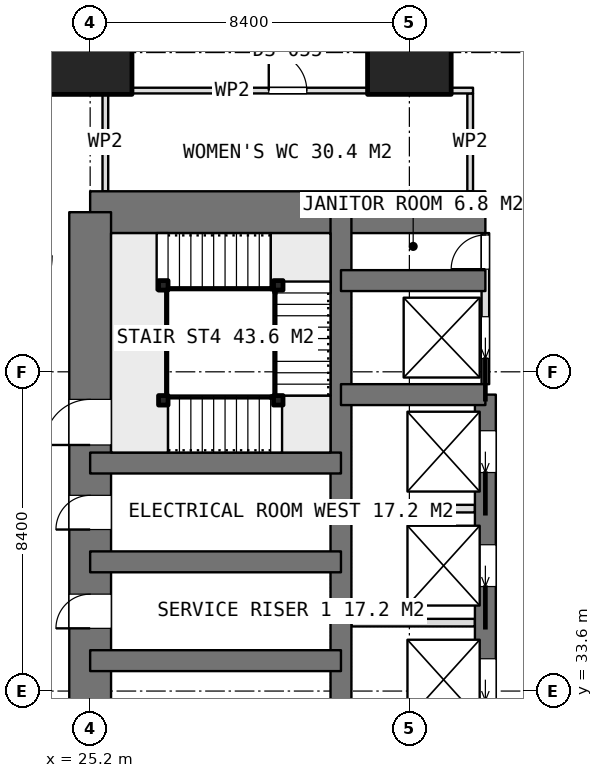
"""IFC4 building model, lengths in metres.
Left out: names, types, materials, properties, quantities, classifications, styles, units other than length and angle.
Written with IfcOpenShell. Run it as: python <this file> out.ifc"""

import sys

from ifc_helpers import new_model, si_unit, direction, frame, frame_2d, origin, origin_2d, place, context, subcontext, project, spatial, rectangle, extrude, element, fill, save


model = new_model("IFC4")
c1 = context("Model", 3, precision=1e-05, world=origin(), true_north=direction((0.0, 1.0)))
c2 = subcontext(c1, "Body", "Model", "MODEL_VIEW")
j1 = project(units=[si_unit("LENGTHUNIT", "METRE"), si_unit("PLANEANGLEUNIT", "RADIAN")], contexts=[c1])
p1 = place(None, origin())
s1 = spatial("IfcSite", under=j1, at=p1, CompositionType="ELEMENT")
p2 = place(p1, origin())
s2 = spatial("IfcBuilding", under=s1, at=p2, CompositionType="ELEMENT")
p3 = place(p2, frame((0.0, 0.0, 47.9)))
s3 = spatial("IfcBuildingStorey", under=s2, at=p3, CompositionType="ELEMENT", Elevation=47.9)
p4 = place(p3, frame((25.2, 46.2, 0.0), z_axis=(0.0, 0.0, 1.0), x_axis=(1.0, 0.0, 0.0)))
e1 = element("IfcWall", 1, at=p4, inside=s3, PredefinedType="SHEAR", context=c2, shape_type="SweptSolid", body=[
    extrude(rectangle(XDim=10.4, YDim=1.1, at=frame_2d((5.2, 0.0))), origin(), (0.0, 0.0, 1.0), 3.75),
])
p5 = place(p3, frame((25.2, 21.0, 0.0), z_axis=(0.0, 0.0, 1.0), x_axis=(0.0, 1.0, 0.0)))
e2 = element("IfcWall", 2, at=p5, inside=s3, PredefinedType="SHEAR", context=c2, shape_type="SweptSolid", body=[
    extrude(rectangle(XDim=25.2, YDim=1.1, at=frame_2d((12.6, 0.0))), origin(), (0.0, 0.0, 1.0), 3.75),
])
p6 = place(p5, frame((7.8, 0.0, 0.0)))
e3 = element("IfcOpeningElement", 3, at=p6, cuts=e2, PredefinedType="OPENING", context=c2, shape_type="SweptSolid", body=[
    extrude(rectangle(XDim=1.2, YDim=2.1, at=frame_2d((0.6, 1.05))), frame((0.0, 0.56, 0.0), z_axis=(0.0, -1.0, 0.0), x_axis=(1.0, 0.0, 0.0)), (0.0, 0.0, 1.0), 1.12),
])
p7 = place(p5, frame((14.25, 0.0, 0.0)))
e4 = element("IfcOpeningElement", 4, at=p7, cuts=e2, PredefinedType="OPENING", context=c2, shape_type="SweptSolid", body=[
    extrude(rectangle(XDim=0.9, YDim=2.1, at=frame_2d((0.45, 1.05))), frame((0.0, 0.56, 0.0), z_axis=(0.0, -1.0, 0.0), x_axis=(1.0, 0.0, 0.0)), (0.0, 0.0, 1.0), 1.12),
])
p8 = place(p5, frame((16.85, 0.0, 0.0)))
e5 = element("IfcOpeningElement", 5, at=p8, cuts=e2, PredefinedType="OPENING", context=c2, shape_type="SweptSolid", body=[
    extrude(rectangle(XDim=0.9, YDim=2.1, at=frame_2d((0.45, 1.05))), frame((0.0, 0.56, 0.0), z_axis=(0.0, -1.0, 0.0), x_axis=(1.0, 0.0, 0.0)), (0.0, 0.0, 1.0), 1.12),
])
p9 = place(p5, frame((19.075, 0.0, 0.0)))
e6 = element("IfcOpeningElement", 6, at=p9, cuts=e2, PredefinedType="OPENING", context=c2, shape_type="SweptSolid", body=[
    extrude(rectangle(XDim=1.2, YDim=2.1, at=frame_2d((0.6, 1.05))), frame((0.0, 0.56, 0.0), z_axis=(0.0, -1.0, 0.0), x_axis=(1.0, 0.0, 0.0)), (0.0, 0.0, 1.0), 1.12),
])
p10 = place(p3, frame((31.8, 21.0, 0.0), z_axis=(0.0, 0.0, 1.0), x_axis=(0.0, 1.0, 0.0)))
e7 = element("IfcWall", 7, at=p10, inside=s3, PredefinedType="SHEAR", context=c2, shape_type="SweptSolid", body=[
    extrude(rectangle(XDim=25.2, YDim=0.55, at=frame_2d((12.6, 0.0))), origin(), (0.0, 0.0, 1.0), 3.75),
])
p11 = place(p3, frame((35.6, 23.4, 0.0), z_axis=(0.0, 0.0, 1.0), x_axis=(0.0, 1.0, 0.0)))
e8 = element("IfcWall", 8, at=p11, inside=s3, PredefinedType="SHEAR", context=c2, shape_type="SweptSolid", body=[
    extrude(rectangle(XDim=18.0, YDim=0.55, at=frame_2d((9.0, 0.0))), origin(), (0.0, 0.0, 1.0), 3.75),
])
p12 = place(p11, frame((0.95, 0.0, 0.0)))
e9 = element("IfcOpeningElement", 9, at=p12, cuts=e8, PredefinedType="OPENING", context=c2, shape_type="SweptSolid", body=[
    extrude(rectangle(XDim=1.1, YDim=2.1, at=frame_2d((0.55, 1.05))), frame((0.0, 0.285, 0.0), z_axis=(0.0, -1.0, 0.0), x_axis=(1.0, 0.0, 0.0)), (0.0, 0.0, 1.0), 0.57),
])
p13 = place(p11, frame((3.95, 0.0, 0.0)))
e10 = element("IfcOpeningElement", 10, at=p13, cuts=e8, PredefinedType="OPENING", context=c2, shape_type="SweptSolid", body=[
    extrude(rectangle(XDim=1.1, YDim=2.1, at=frame_2d((0.55, 1.05))), frame((0.0, 0.285, 0.0), z_axis=(0.0, -1.0, 0.0), x_axis=(1.0, 0.0, 0.0)), (0.0, 0.0, 1.0), 0.57),
])
p14 = place(p11, frame((6.95, 0.0, 0.0)))
e11 = element("IfcOpeningElement", 11, at=p14, cuts=e8, PredefinedType="OPENING", context=c2, shape_type="SweptSolid", body=[
    extrude(rectangle(XDim=1.1, YDim=2.1, at=frame_2d((0.55, 1.05))), frame((0.0, 0.285, 0.0), z_axis=(0.0, -1.0, 0.0), x_axis=(1.0, 0.0, 0.0)), (0.0, 0.0, 1.0), 0.57),
])
p15 = place(p11, frame((9.95, 0.0, 0.0)))
e12 = element("IfcOpeningElement", 12, at=p15, cuts=e8, PredefinedType="OPENING", context=c2, shape_type="SweptSolid", body=[
    extrude(rectangle(XDim=1.1, YDim=2.1, at=frame_2d((0.55, 1.05))), frame((0.0, 0.285, 0.0), z_axis=(0.0, -1.0, 0.0), x_axis=(1.0, 0.0, 0.0)), (0.0, 0.0, 1.0), 0.57),
])
p16 = place(p11, frame((12.95, 0.0, 0.0)))
e13 = element("IfcOpeningElement", 13, at=p16, cuts=e8, PredefinedType="OPENING", context=c2, shape_type="SweptSolid", body=[
    extrude(rectangle(XDim=1.1, YDim=2.1, at=frame_2d((0.55, 1.05))), frame((0.0, 0.285, 0.0), z_axis=(0.0, -1.0, 0.0), x_axis=(1.0, 0.0, 0.0)), (0.0, 0.0, 1.0), 0.57),
])
p17 = place(p11, frame((15.95, 0.0, 0.0)))
e14 = element("IfcOpeningElement", 14, at=p17, cuts=e8, PredefinedType="OPENING", context=c2, shape_type="SweptSolid", body=[
    extrude(rectangle(XDim=1.1, YDim=2.1, at=frame_2d((0.55, 1.05))), frame((0.0, 0.285, 0.0), z_axis=(0.0, -1.0, 0.0), x_axis=(1.0, 0.0, 0.0)), (0.0, 0.0, 1.0), 0.57),
])
for number, where, z_axis, x_axis in (
    (15, (31.8, 41.4, 0.0), (0.0, 0.0, 1.0), (1.0, 0.0, 0.0)),
    (16, (31.8, 44.4, 0.0), (0.0, 0.0, 1.0), (1.0, 0.0, 0.0)),
):
    element("IfcWall", number, at=place(p3, frame(where, z_axis=z_axis, x_axis=x_axis)), inside=s3, PredefinedType="SHEAR", context=c2, shape_type="SweptSolid", body=[
        extrude(rectangle(XDim=3.8, YDim=0.55, at=frame_2d((1.9, 0.0))), origin(), (0.0, 0.0, 1.0), 3.75),
    ])
for number, where, z_axis, x_axis in (
    (17, (25.2, 34.4, 0.0), (0.0, 0.0, 1.0), (1.0, 0.0, 0.0)),
    (18, (25.2, 37.0, 0.0), (0.0, 0.0, 1.0), (1.0, 0.0, 0.0)),
    (19, (25.2, 39.6, 0.0), (0.0, 0.0, 1.0), (1.0, 0.0, 0.0)),
):
    element("IfcWall", number, at=place(p3, frame(where, z_axis=z_axis, x_axis=x_axis)), inside=s3, PredefinedType="SHEAR", context=c2, shape_type="SweptSolid", body=[
        extrude(rectangle(XDim=6.6, YDim=0.55, at=frame_2d((3.3, 0.0))), origin(), (0.0, 0.0, 1.0), 3.75),
    ])
for number, where, z_axis, x_axis in (
    (20, (25.2, 50.4, 0.0), (0.0, 0.0, 1.0), (1.0, 0.0, 0.0)),
    (21, (33.6, 50.4, 0.0), (0.0, 0.0, 1.0), (1.0, 0.0, 0.0)),
):
    element("IfcColumn", number, at=place(p3, frame(where, z_axis=z_axis, x_axis=x_axis)), inside=s3, PredefinedType="COLUMN", context=c2, shape_type="SweptSolid", body=[
        extrude(rectangle(XDim=2.2, YDim=2.2, at=origin_2d()), origin(), (0.0, 0.0, 1.0), 3.75),
    ])
for number, where, z_axis, x_axis in (
    (22, (32.075, 35.4, 0.0), (0.0, 0.0, 1.0), (1.0, 0.0, 0.0)),
    (23, (32.075, 38.4, 0.0), (0.0, 0.0, 1.0), (1.0, 0.0, 0.0)),
):
    element("IfcWall", number, at=place(p3, frame(where, z_axis=z_axis, x_axis=x_axis)), inside=s3, PredefinedType="PARTITIONING", context=c2, shape_type="SweptSolid", body=[
        extrude(rectangle(XDim=3.25, YDim=0.2, at=frame_2d((1.625, 0.0))), origin(), (0.0, 0.0, 1.0), 3.5),
    ])
p18 = place(p3, frame((35.6, 41.675, 0.0), z_axis=(0.0, 0.0, 1.0), x_axis=(0.0, 1.0, 0.0)))
e24 = element("IfcWall", 24, at=p18, inside=s3, PredefinedType="PARTITIONING", context=c2, shape_type="SweptSolid", body=[
    extrude(rectangle(XDim=3.975, YDim=0.2, at=frame_2d((1.987, 0.0))), origin(), (0.0, 0.0, 1.0), 3.5),
])
p19 = place(p18, frame((3.025, 0.0, 0.0)))
e25 = element("IfcOpeningElement", 25, at=p19, cuts=e24, PredefinedType="OPENING", context=c2, shape_type="SweptSolid", body=[
    extrude(rectangle(XDim=0.9, YDim=2.1, at=frame_2d((0.45, 1.05))), frame((0.0, 0.11, 0.0), z_axis=(0.0, -1.0, 0.0), x_axis=(1.0, 0.0, 0.0)), (0.0, 0.0, 1.0), 0.22),
])
p20 = place(p18, frame((0.675, 0.0, 0.0)))
e26 = element("IfcOpeningElement", 26, at=p20, cuts=e24, PredefinedType="OPENING", context=c2, shape_type="SweptSolid", body=[
    extrude(rectangle(XDim=1.1, YDim=2.1, at=frame_2d((0.55, 1.05))), frame((0.0, 0.11, 0.0), z_axis=(0.0, -1.0, 0.0), x_axis=(1.0, 0.0, 0.0)), (0.0, 0.0, 1.0), 0.22),
])
p21 = place(p3, frame((25.525, 49.4, 0.0), z_axis=(0.0, 0.0, 1.0), x_axis=(1.0, 0.0, 0.0)))
e27 = element("IfcWall", 27, at=p21, inside=s3, PredefinedType="PARTITIONING", context=c2, shape_type="SweptSolid", body=[
    extrude(rectangle(XDim=9.75, YDim=0.15, at=frame_2d((4.875, 0.0))), origin(), (0.0, 0.0, 1.0), 3.5),
])
p22 = place(p21, frame((4.375, 0.0, 0.0)))
e28 = element("IfcOpeningElement", 28, at=p22, cuts=e27, PredefinedType="OPENING", context=c2, shape_type="SweptSolid", body=[
    extrude(rectangle(XDim=1.0, YDim=2.1, at=frame_2d((0.5, 1.05))), frame((0.0, 0.085, 0.0), z_axis=(0.0, -1.0, 0.0), x_axis=(1.0, 0.0, 0.0)), (0.0, 0.0, 1.0), 0.17),
])
for number, where, z_axis, x_axis in (
    (29, (25.6, 46.75, 0.0), (0.0, 0.0, 1.0), (0.0, 1.0, 0.0)),
    (30, (35.2, 46.75, 0.0), (0.0, 0.0, 1.0), (0.0, 1.0, 0.0)),
):
    element("IfcWall", number, at=place(p3, frame(where, z_axis=z_axis, x_axis=x_axis)), inside=s3, PredefinedType="PARTITIONING", context=c2, shape_type="SweptSolid", body=[
        extrude(rectangle(XDim=2.575, YDim=0.15, at=frame_2d((1.288, 0.0))), origin(), (0.0, 0.0, 1.0), 3.5),
    ])
for number, where, z_axis, x_axis in (
    (31, (27.125, 41.25, 0.0), (0.0, 0.0, 1.0), (1.0, 0.0, 0.0)),
    (32, (30.15, 41.25, 0.0), (0.0, 0.0, 1.0), (1.0, 0.0, 0.0)),
    (33, (30.15, 44.275, 0.0), (0.0, 0.0, 1.0), (1.0, 0.0, 0.0)),
    (34, (27.125, 44.275, 0.0), (0.0, 0.0, 1.0), (1.0, 0.0, 0.0)),
):
    element("IfcColumn", number, at=place(p3, frame(where, z_axis=z_axis, x_axis=x_axis)), inside=s3, PredefinedType="COLUMN", context=c2, shape_type="SweptSolid", body=[
        extrude(rectangle(XDim=0.25, YDim=0.25, at=origin_2d()), origin(), (0.0, 0.0, 1.0), 3.75),
    ])
p23 = place(p7, origin())
e35 = element("IfcDoor", 35, at=p23, inside=s3, OperationType="SINGLE_SWING_LEFT", PredefinedType="DOOR", context=c2, shape_type="SweptSolid", body=[
    extrude(rectangle(XDim=0.9, YDim=2.1, at=frame_2d((0.45, 1.05))), frame((0.0, 0.025, 0.0), z_axis=(0.0, -1.0, 0.0), x_axis=(1.0, 0.0, 0.0)), (0.0, 0.0, 1.0), 0.05),
])
fill(e4, e35)
p24 = place(p8, origin())
e36 = element("IfcDoor", 36, at=p24, inside=s3, OperationType="SINGLE_SWING_LEFT", PredefinedType="DOOR", context=c2, shape_type="SweptSolid", body=[
    extrude(rectangle(XDim=0.9, YDim=2.1, at=frame_2d((0.45, 1.05))), frame((0.0, 0.025, 0.0), z_axis=(0.0, -1.0, 0.0), x_axis=(1.0, 0.0, 0.0)), (0.0, 0.0, 1.0), 0.05),
])
fill(e5, e36)
p25 = place(p19, origin())
e37 = element("IfcDoor", 37, at=p25, inside=s3, OperationType="SINGLE_SWING_LEFT", PredefinedType="DOOR", context=c2, shape_type="SweptSolid", body=[
    extrude(rectangle(XDim=0.9, YDim=2.1, at=frame_2d((0.45, 1.05))), frame((0.0, 0.025, 0.0), z_axis=(0.0, -1.0, 0.0), x_axis=(1.0, 0.0, 0.0)), (0.0, 0.0, 1.0), 0.05),
])
fill(e25, e37)
p26 = place(p15, origin())
e38 = element("IfcDoor", 38, at=p26, inside=s3, OperationType="SLIDING_TO_LEFT", PredefinedType="USERDEFINED", context=c2, shape_type="SweptSolid", body=[
    extrude(rectangle(XDim=1.1, YDim=2.1, at=frame_2d((0.55, 1.05))), frame((0.0, 0.025, 0.0), z_axis=(0.0, -1.0, 0.0), x_axis=(1.0, 0.0, 0.0)), (0.0, 0.0, 1.0), 0.05),
])
fill(e12, e38)
p27 = place(p16, origin())
e39 = element("IfcDoor", 39, at=p27, inside=s3, OperationType="SLIDING_TO_LEFT", PredefinedType="USERDEFINED", context=c2, shape_type="SweptSolid", body=[
    extrude(rectangle(XDim=1.1, YDim=2.1, at=frame_2d((0.55, 1.05))), frame((0.0, 0.025, 0.0), z_axis=(0.0, -1.0, 0.0), x_axis=(1.0, 0.0, 0.0)), (0.0, 0.0, 1.0), 0.05),
])
fill(e13, e39)
p28 = place(p17, origin())
e40 = element("IfcDoor", 40, at=p28, inside=s3, OperationType="SLIDING_TO_LEFT", PredefinedType="USERDEFINED", context=c2, shape_type="SweptSolid", body=[
    extrude(rectangle(XDim=1.1, YDim=2.1, at=frame_2d((0.55, 1.05))), frame((0.0, 0.025, 0.0), z_axis=(0.0, -1.0, 0.0), x_axis=(1.0, 0.0, 0.0)), (0.0, 0.0, 1.0), 0.05),
])
fill(e14, e40)
p29 = place(p20, origin())
e41 = element("IfcDoor", 41, at=p29, inside=s3, OperationType="SLIDING_TO_LEFT", PredefinedType="USERDEFINED", context=c2, shape_type="SweptSolid", body=[
    extrude(rectangle(XDim=1.1, YDim=2.1, at=frame_2d((0.55, 1.05))), frame((0.0, 0.025, 0.0), z_axis=(0.0, -1.0, 0.0), x_axis=(1.0, 0.0, 0.0)), (0.0, 0.0, 1.0), 0.05),
])
fill(e26, e41)
p30 = place(p22, origin())
e42 = element("IfcDoor", 42, at=p30, inside=s3, OperationType="SINGLE_SWING_LEFT", PredefinedType="DOOR", context=c2, shape_type="SweptSolid", body=[
    extrude(rectangle(XDim=1.0, YDim=2.1, at=frame_2d((0.5, 1.05))), frame((0.0, 0.025, 0.0), z_axis=(0.0, -1.0, 0.0), x_axis=(1.0, 0.0, 0.0)), (0.0, 0.0, 1.0), 0.05),
])
fill(e28, e42)
p31 = place(p9, origin())
e43 = element("IfcDoor", 43, at=p31, inside=s3, OperationType="SINGLE_SWING_RIGHT", PredefinedType="DOOR", context=c2, shape_type="SweptSolid", body=[
    extrude(rectangle(XDim=1.2, YDim=2.1, at=frame_2d((0.6, 1.05))), frame((0.0, 0.025, 0.0), z_axis=(0.0, -1.0, 0.0), x_axis=(1.0, 0.0, 0.0)), (0.0, 0.0, 1.0), 0.05),
])
fill(e6, e43)
save(model, sys.argv[1])
